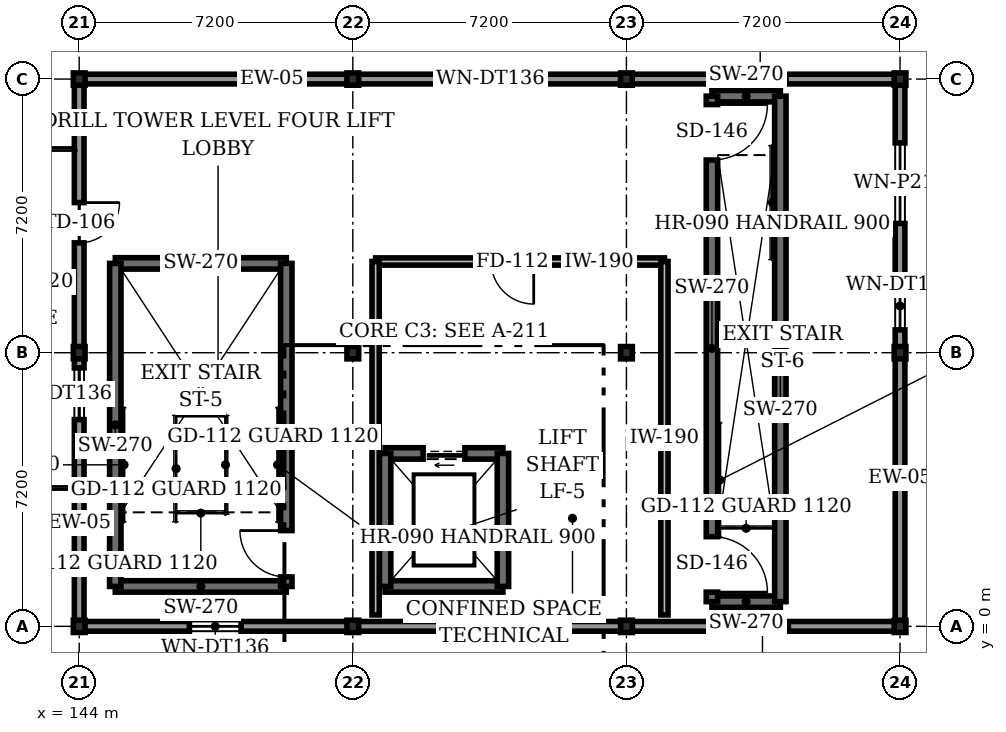
"""IFC4 building model, lengths in metres.
Left out: names, types, materials, properties, quantities, classifications, styles, units other than length and angle.
Written with IfcOpenShell. Run it as: python <this file> out.ifc"""

import sys

from ifc_helpers import new_model, si_unit, direction, frame, frame_2d, origin, origin_2d, place, context, subcontext, project, spatial, rectangle, i_section, extrude, element, fill, save


model = new_model("IFC4")
c1 = context("Model", 3, precision=1e-05, world=origin(), true_north=direction((0.0, 1.0)))
c2 = subcontext(c1, "Body", "Model", "MODEL_VIEW")
j1 = project(units=[si_unit("LENGTHUNIT", "METRE"), si_unit("PLANEANGLEUNIT", "RADIAN")], contexts=[c1])
p1 = place(None, origin())
s1 = spatial("IfcSite", under=j1, at=p1, CompositionType="ELEMENT")
p2 = place(p1, origin())
s2 = spatial("IfcBuilding", under=s1, at=p2, CompositionType="ELEMENT")
p3 = place(p2, frame((0.0, 0.0, 14.4)))
s3 = spatial("IfcBuildingStorey", under=s2, at=p3, CompositionType="ELEMENT", Elevation=14.4)
for number, where, z_axis, x_axis in (
    (1, (144.0, 0.0, 0.0), (0.0, 0.0, 1.0), (1.0, 0.0, 0.0)),
    (2, (144.0, 7.2, 0.0), (0.0, 0.0, 1.0), (1.0, 0.0, 0.0)),
    (3, (144.0, 14.4, 0.0), (0.0, 0.0, 1.0), (1.0, 0.0, 0.0)),
    (4, (151.2, 0.0, 0.0), (0.0, 0.0, 1.0), (1.0, 0.0, 0.0)),
    (5, (151.2, 7.2, 0.0), (0.0, 0.0, 1.0), (1.0, 0.0, 0.0)),
    (6, (151.2, 14.4, 0.0), (0.0, 0.0, 1.0), (1.0, 0.0, 0.0)),
    (7, (158.4, 0.0, 0.0), (0.0, 0.0, 1.0), (1.0, 0.0, 0.0)),
    (8, (158.4, 7.2, 0.0), (0.0, 0.0, 1.0), (1.0, 0.0, 0.0)),
    (9, (158.4, 14.4, 0.0), (0.0, 0.0, 1.0), (1.0, 0.0, 0.0)),
    (10, (165.6, 0.0, 0.0), (0.0, 0.0, 1.0), (1.0, 0.0, 0.0)),
    (11, (165.6, 7.2, 0.0), (0.0, 0.0, 1.0), (1.0, 0.0, 0.0)),
    (12, (165.6, 14.4, 0.0), (0.0, 0.0, 1.0), (1.0, 0.0, 0.0)),
):
    element("IfcColumn", number, at=place(p3, frame(where, z_axis=z_axis, x_axis=x_axis)), inside=s3, PredefinedType="COLUMN", context=c2, shape_type="SweptSolid", body=[
        extrude(i_section(OverallWidth=0.309, OverallDepth=0.323, WebThickness=0.014, FlangeThickness=0.023, at=origin_2d()), origin(), (0.0, 0.0, 1.0), 3.6),
    ])
p4 = place(p3, frame((165.6, 0.0, 0.0), z_axis=(0.0, 0.0, 1.0), x_axis=(-1.0, 0.0, 0.0)))
e13 = element("IfcWall", 13, at=p4, inside=s3, PredefinedType="STANDARD", context=c2, shape_type="SweptSolid", body=[
    extrude(rectangle(XDim=21.6, YDim=0.255, at=frame_2d((10.8, 0.0))), origin(), (0.0, 0.0, 1.0), 2.75),
])
p5 = place(p4, frame((17.34, 0.0, 1.15)))
e14 = element("IfcOpeningElement", 14, at=p5, cuts=e13, PredefinedType="OPENING", context=c2, shape_type="SweptSolid", body=[
    extrude(rectangle(XDim=1.36, YDim=1.42, at=frame_2d((0.68, 0.71))), frame((0.0, 0.137, 0.0), z_axis=(0.0, -1.0, 0.0), x_axis=(1.0, 0.0, 0.0)), (0.0, 0.0, 1.0), 0.275),
])
p6 = place(p4, frame((2.94, 0.0, 1.15)))
e15 = element("IfcOpeningElement", 15, at=p6, cuts=e13, PredefinedType="OPENING", context=c2, shape_type="SweptSolid", body=[
    extrude(rectangle(XDim=1.36, YDim=1.42, at=frame_2d((0.68, 0.71))), frame((0.0, 0.137, 0.0), z_axis=(0.0, -1.0, 0.0), x_axis=(1.0, 0.0, 0.0)), (0.0, 0.0, 1.0), 0.275),
])
p7 = place(p3, frame((165.6, 0.0, 0.0), z_axis=(0.0, 0.0, 1.0), x_axis=(0.0, 1.0, 0.0)))
e16 = element("IfcWall", 16, at=p7, inside=s3, PredefinedType="STANDARD", context=c2, shape_type="SweptSolid", body=[
    extrude(rectangle(XDim=14.4, YDim=0.255, at=frame_2d((7.2, 0.0))), origin(), (0.0, 0.0, 1.0), 2.75),
])
p8 = place(p7, frame((7.8, 0.0, 1.05)))
e17 = element("IfcOpeningElement", 17, at=p8, cuts=e16, PredefinedType="OPENING", context=c2, shape_type="SweptSolid", body=[
    extrude(rectangle(XDim=1.26, YDim=1.38, at=frame_2d((0.63, 0.69))), frame((0.0, 0.137, 0.0), z_axis=(0.0, -1.0, 0.0), x_axis=(1.0, 0.0, 0.0)), (0.0, 0.0, 1.0), 0.275),
])
p9 = place(p7, frame((10.6, 0.0, 1.05)))
e18 = element("IfcOpeningElement", 18, at=p9, cuts=e16, PredefinedType="OPENING", context=c2, shape_type="SweptSolid", body=[
    extrude(rectangle(XDim=2.12, YDim=1.76, at=frame_2d((1.06, 0.88))), frame((0.0, 0.137, 0.0), z_axis=(0.0, -1.0, 0.0), x_axis=(1.0, 0.0, 0.0)), (0.0, 0.0, 1.0), 0.275),
])
p10 = place(p3, frame((144.0, 14.4, 0.0), z_axis=(0.0, 0.0, 1.0), x_axis=(0.0, -1.0, 0.0)))
e19 = element("IfcWall", 19, at=p10, inside=s3, PredefinedType="STANDARD", context=c2, shape_type="SweptSolid", body=[
    extrude(rectangle(XDim=14.4, YDim=0.255, at=frame_2d((7.2, 0.0))), origin(), (0.0, 0.0, 1.0), 2.75),
])
p11 = place(p10, frame((3.25, 0.0, 0.0)))
e20 = element("IfcOpeningElement", 20, at=p11, cuts=e19, PredefinedType="OPENING", context=c2, shape_type="SweptSolid", body=[
    extrude(rectangle(XDim=1.06, YDim=2.16, at=frame_2d((0.53, 1.08))), frame((0.0, 0.137, 0.0), z_axis=(0.0, -1.0, 0.0), x_axis=(1.0, 0.0, 0.0)), (0.0, 0.0, 1.0), 0.275),
])
p12 = place(p10, frame((7.6, 0.0, 1.05)))
e21 = element("IfcOpeningElement", 21, at=p12, cuts=e19, PredefinedType="OPENING", context=c2, shape_type="SweptSolid", body=[
    extrude(rectangle(XDim=1.36, YDim=1.42, at=frame_2d((0.68, 0.71))), frame((0.0, 0.137, 0.0), z_axis=(0.0, -1.0, 0.0), x_axis=(1.0, 0.0, 0.0)), (0.0, 0.0, 1.0), 0.275),
])
p13 = place(p3, frame((165.6, 14.4, 0.0), z_axis=(0.0, 0.0, 1.0), x_axis=(-1.0, 0.0, 0.0)))
e22 = element("IfcWall", 22, at=p13, inside=s3, PredefinedType="STANDARD", context=c2, shape_type="SweptSolid", body=[
    extrude(rectangle(XDim=21.6, YDim=0.255, at=frame_2d((10.8, 0.0))), origin(), (0.0, 0.0, 1.0), 2.75),
])
p14 = place(p13, frame((3.0, 0.0, 1.15)))
e23 = element("IfcOpeningElement", 23, at=p14, cuts=e22, PredefinedType="OPENING", context=c2, shape_type="SweptSolid", body=[
    extrude(rectangle(XDim=1.36, YDim=1.42, at=frame_2d((0.68, 0.71))), frame((0.0, 0.137, 0.0), z_axis=(0.0, -1.0, 0.0), x_axis=(1.0, 0.0, 0.0)), (0.0, 0.0, 1.0), 0.275),
])
p15 = place(p13, frame((10.1, 0.0, 1.15)))
e24 = element("IfcOpeningElement", 24, at=p15, cuts=e22, PredefinedType="OPENING", context=c2, shape_type="SweptSolid", body=[
    extrude(rectangle(XDim=1.36, YDim=1.42, at=frame_2d((0.68, 0.71))), frame((0.0, 0.137, 0.0), z_axis=(0.0, -1.0, 0.0), x_axis=(1.0, 0.0, 0.0)), (0.0, 0.0, 1.0), 0.275),
])
for number, where, z_axis, x_axis in (
    (25, (144.95, 1.05, 0.0), (0.0, 0.0, 1.0), (1.0, 0.0, 0.0)),
    (26, (149.45, 9.55, 0.0), (0.0, 0.0, 1.0), (-1.0, 0.0, 0.0)),
):
    element("IfcWall", number, at=place(p3, frame(where, z_axis=z_axis, x_axis=x_axis)), inside=s3, PredefinedType="SHEAR", context=c2, shape_type="SweptSolid", body=[
        extrude(rectangle(XDim=4.5, YDim=0.3, at=frame_2d((2.25, 0.0))), origin(), (0.0, 0.0, 1.0), 3.36),
    ])
p16 = place(p3, frame((144.95, 9.55, 0.0), z_axis=(0.0, 0.0, 1.0), x_axis=(0.0, -1.0, 0.0)))
e27 = element("IfcWall", 27, at=p16, inside=s3, PredefinedType="SHEAR", context=c2, shape_type="SweptSolid", body=[
    extrude(rectangle(XDim=8.5, YDim=0.3, at=frame_2d((4.25, 0.0))), origin(), (0.0, 0.0, 1.0), 3.36),
])
p17 = place(p3, frame((149.45, 1.05, 0.0), z_axis=(0.0, 0.0, 1.0), x_axis=(0.0, 1.0, 0.0)))
e28 = element("IfcWall", 28, at=p17, inside=s3, PredefinedType="SHEAR", context=c2, shape_type="SweptSolid", body=[
    extrude(rectangle(XDim=8.5, YDim=0.3, at=frame_2d((4.25, 0.0))), origin(), (0.0, 0.0, 1.0), 3.36),
])
p18 = place(p17, frame((0.25, 0.0, 0.0)))
e29 = element("IfcOpeningElement", 29, at=p18, cuts=e28, PredefinedType="OPENING", context=c2, shape_type="SweptSolid", body=[
    extrude(rectangle(XDim=1.22, YDim=2.16, at=frame_2d((0.61, 1.08))), frame((0.0, 0.16, 0.0), z_axis=(0.0, -1.0, 0.0), x_axis=(1.0, 0.0, 0.0)), (0.0, 0.0, 1.0), 0.32),
])
p19 = place(p3, frame((152.05, 1.05, 0.0), z_axis=(0.0, 0.0, 1.0), x_axis=(1.0, 0.0, 0.0)))
e30 = element("IfcWall", 30, at=p19, inside=s3, PredefinedType="SHEAR", context=c2, shape_type="SweptSolid", body=[
    extrude(rectangle(XDim=3.1, YDim=0.3, at=frame_2d((1.55, 0.0))), origin(), (0.0, 0.0, 1.0), 3.36),
])
p20 = place(p3, frame((155.15, 4.55, 0.0), z_axis=(0.0, 0.0, 1.0), x_axis=(-1.0, 0.0, 0.0)))
e31 = element("IfcWall", 31, at=p20, inside=s3, PredefinedType="SHEAR", context=c2, shape_type="SweptSolid", body=[
    extrude(rectangle(XDim=3.1, YDim=0.3, at=frame_2d((1.55, 0.0))), origin(), (0.0, 0.0, 1.0), 3.36),
])
p21 = place(p20, frame((1.0, 0.0, 0.0)))
e32 = element("IfcOpeningElement", 32, at=p21, cuts=e31, PredefinedType="OPENING", context=c2, shape_type="SweptSolid", body=[
    extrude(rectangle(XDim=1.1, YDim=2.22, at=frame_2d((0.55, 1.11))), frame((0.0, 0.16, 0.0), z_axis=(0.0, -1.0, 0.0), x_axis=(1.0, 0.0, 0.0)), (0.0, 0.0, 1.0), 0.32),
])
for number, where, z_axis, x_axis in (
    (33, (152.05, 4.55, 0.0), (0.0, 0.0, 1.0), (0.0, -1.0, 0.0)),
    (34, (155.15, 1.05, 0.0), (0.0, 0.0, 1.0), (0.0, 1.0, 0.0)),
):
    element("IfcWall", number, at=place(p3, frame(where, z_axis=z_axis, x_axis=x_axis)), inside=s3, PredefinedType="SHEAR", context=c2, shape_type="SweptSolid", body=[
        extrude(rectangle(XDim=3.5, YDim=0.3, at=frame_2d((1.75, 0.0))), origin(), (0.0, 0.0, 1.0), 3.36),
    ])
for number, where, z_axis, x_axis in (
    (35, (160.65, 0.65, 0.0), (0.0, 0.0, 1.0), (1.0, 0.0, 0.0)),
    (36, (162.45, 13.95, 0.0), (0.0, 0.0, 1.0), (-1.0, 0.0, 0.0)),
):
    element("IfcWall", number, at=place(p3, frame(where, z_axis=z_axis, x_axis=x_axis)), inside=s3, PredefinedType="SHEAR", context=c2, shape_type="SweptSolid", body=[
        extrude(rectangle(XDim=1.8, YDim=0.3, at=frame_2d((0.9, 0.0))), origin(), (0.0, 0.0, 1.0), 3.36),
    ])
p22 = place(p3, frame((160.65, 13.95, 0.0), z_axis=(0.0, 0.0, 1.0), x_axis=(0.0, -1.0, 0.0)))
e37 = element("IfcWall", 37, at=p22, inside=s3, PredefinedType="SHEAR", context=c2, shape_type="SweptSolid", body=[
    extrude(rectangle(XDim=13.3, YDim=0.3, at=frame_2d((6.65, 0.0))), origin(), (0.0, 0.0, 1.0), 3.36),
])
p23 = place(p22, frame((11.59, 0.0, 0.0)))
e38 = element("IfcOpeningElement", 38, at=p23, cuts=e37, PredefinedType="OPENING", context=c2, shape_type="SweptSolid", body=[
    extrude(rectangle(XDim=1.46, YDim=2.24, at=frame_2d((0.73, 1.12))), frame((0.0, 0.16, 0.0), z_axis=(0.0, -1.0, 0.0), x_axis=(1.0, 0.0, 0.0)), (0.0, 0.0, 1.0), 0.32),
])
p24 = place(p22, frame((0.22, 0.0, 0.0)))
e39 = element("IfcOpeningElement", 39, at=p24, cuts=e37, PredefinedType="OPENING", context=c2, shape_type="SweptSolid", body=[
    extrude(rectangle(XDim=1.46, YDim=2.24, at=frame_2d((0.73, 1.12))), frame((0.0, 0.16, 0.0), z_axis=(0.0, -1.0, 0.0), x_axis=(1.0, 0.0, 0.0)), (0.0, 0.0, 1.0), 0.32),
])
p25 = place(p3, frame((162.45, 0.65, 0.0), z_axis=(0.0, 0.0, 1.0), x_axis=(0.0, 1.0, 0.0)))
e40 = element("IfcWall", 40, at=p25, inside=s3, PredefinedType="SHEAR", context=c2, shape_type="SweptSolid", body=[
    extrude(rectangle(XDim=13.3, YDim=0.3, at=frame_2d((6.65, 0.0))), origin(), (0.0, 0.0, 1.0), 3.36),
])
p26 = place(p3, frame((159.4, 9.6, 0.0), z_axis=(0.0, 0.0, 1.0), x_axis=(-1.0, 0.0, 0.0)))
e41 = element("IfcWall", 41, at=p26, inside=s3, PredefinedType="STANDARD", context=c2, shape_type="SweptSolid", body=[
    extrude(rectangle(XDim=7.6, YDim=0.19, at=frame_2d((3.8, 0.0))), origin(), (0.0, 0.0, 1.0), 2.827),
])
p27 = place(p26, frame((3.44, 0.0, 0.0)))
e42 = element("IfcOpeningElement", 42, at=p27, cuts=e41, PredefinedType="OPENING", context=c2, shape_type="SweptSolid", body=[
    extrude(rectangle(XDim=1.12, YDim=2.16, at=frame_2d((0.56, 1.08))), frame((0.0, 0.105, 0.0), z_axis=(0.0, -1.0, 0.0), x_axis=(1.0, 0.0, 0.0)), (0.0, 0.0, 1.0), 0.21),
])
p28 = place(p3, frame((151.8, 9.6, 0.0), z_axis=(0.0, 0.0, 1.0), x_axis=(0.0, -1.0, 0.0)))
e43 = element("IfcWall", 43, at=p28, inside=s3, PredefinedType="STANDARD", context=c2, shape_type="SweptSolid", body=[
    extrude(rectangle(XDim=9.3, YDim=0.19, at=frame_2d((4.65, 0.0))), origin(), (0.0, 0.0, 1.0), 2.827),
])
p29 = place(p3, frame((159.4, 0.3, 0.0), z_axis=(0.0, 0.0, 1.0), x_axis=(0.0, 1.0, 0.0)))
e44 = element("IfcWall", 44, at=p29, inside=s3, PredefinedType="STANDARD", context=c2, shape_type="SweptSolid", body=[
    extrude(rectangle(XDim=9.3, YDim=0.19, at=frame_2d((4.65, 0.0))), origin(), (0.0, 0.0, 1.0), 3.36),
])
p30 = place(p5, origin())
e45 = element("IfcWindow", 45, at=p30, inside=s3, PartitioningType="SINGLE_PANEL", PredefinedType="WINDOW", context=c2, shape_type="SweptSolid", body=[
    extrude(rectangle(XDim=1.36, YDim=1.42, at=frame_2d((0.68, 0.71))), frame((0.0, 0.03, 0.0), z_axis=(0.0, -1.0, 0.0), x_axis=(1.0, 0.0, 0.0)), (0.0, 0.0, 1.0), 0.06),
])
fill(e14, e45)
p31 = place(p6, origin())
e46 = element("IfcWindow", 46, at=p31, inside=s3, PartitioningType="SINGLE_PANEL", PredefinedType="WINDOW", context=c2, shape_type="SweptSolid", body=[
    extrude(rectangle(XDim=1.36, YDim=1.42, at=frame_2d((0.68, 0.71))), frame((0.0, 0.03, 0.0), z_axis=(0.0, -1.0, 0.0), x_axis=(1.0, 0.0, 0.0)), (0.0, 0.0, 1.0), 0.06),
])
fill(e15, e46)
p32 = place(p8, origin())
e47 = element("IfcWindow", 47, at=p32, inside=s3, PartitioningType="SINGLE_PANEL", PredefinedType="WINDOW", context=c2, shape_type="SweptSolid", body=[
    extrude(rectangle(XDim=1.26, YDim=1.38, at=frame_2d((0.63, 0.69))), frame((0.0, 0.03, 0.0), z_axis=(0.0, -1.0, 0.0), x_axis=(1.0, 0.0, 0.0)), (0.0, 0.0, 1.0), 0.06),
])
fill(e17, e47)
p33 = place(p9, origin())
e48 = element("IfcWindow", 48, at=p33, inside=s3, PartitioningType="SINGLE_PANEL", PredefinedType="WINDOW", context=c2, shape_type="SweptSolid", body=[
    extrude(rectangle(XDim=2.12, YDim=1.76, at=frame_2d((1.06, 0.88))), frame((0.0, 0.03, 0.0), z_axis=(0.0, -1.0, 0.0), x_axis=(1.0, 0.0, 0.0)), (0.0, 0.0, 1.0), 0.06),
])
fill(e18, e48)
p34 = place(p11, origin())
e49 = element("IfcDoor", 49, at=p34, inside=s3, OperationType="SINGLE_SWING_LEFT", PredefinedType="DOOR", context=c2, shape_type="SweptSolid", body=[
    extrude(rectangle(XDim=1.06, YDim=2.16, at=frame_2d((0.53, 1.08))), frame((0.0, 0.025, 0.0), z_axis=(0.0, -1.0, 0.0), x_axis=(1.0, 0.0, 0.0)), (0.0, 0.0, 1.0), 0.05),
])
fill(e20, e49)
p35 = place(p12, origin())
e50 = element("IfcWindow", 50, at=p35, inside=s3, PartitioningType="SINGLE_PANEL", PredefinedType="WINDOW", context=c2, shape_type="SweptSolid", body=[
    extrude(rectangle(XDim=1.36, YDim=1.42, at=frame_2d((0.68, 0.71))), frame((0.0, 0.03, 0.0), z_axis=(0.0, -1.0, 0.0), x_axis=(1.0, 0.0, 0.0)), (0.0, 0.0, 1.0), 0.06),
])
fill(e21, e50)
p36 = place(p14, origin())
e51 = element("IfcWindow", 51, at=p36, inside=s3, PartitioningType="SINGLE_PANEL", PredefinedType="WINDOW", context=c2, shape_type="SweptSolid", body=[
    extrude(rectangle(XDim=1.36, YDim=1.42, at=frame_2d((0.68, 0.71))), frame((0.0, 0.03, 0.0), z_axis=(0.0, -1.0, 0.0), x_axis=(1.0, 0.0, 0.0)), (0.0, 0.0, 1.0), 0.06),
])
fill(e23, e51)
p37 = place(p15, origin())
e52 = element("IfcWindow", 52, at=p37, inside=s3, PartitioningType="SINGLE_PANEL", PredefinedType="WINDOW", context=c2, shape_type="SweptSolid", body=[
    extrude(rectangle(XDim=1.36, YDim=1.42, at=frame_2d((0.68, 0.71))), frame((0.0, 0.03, 0.0), z_axis=(0.0, -1.0, 0.0), x_axis=(1.0, 0.0, 0.0)), (0.0, 0.0, 1.0), 0.06),
])
fill(e24, e52)
p38 = place(p18, origin())
e53 = element("IfcDoor", 53, at=p38, inside=s3, OperationType="SINGLE_SWING_RIGHT", PredefinedType="DOOR", context=c2, shape_type="SweptSolid", body=[
    extrude(rectangle(XDim=1.22, YDim=2.16, at=frame_2d((0.61, 1.08))), frame((0.0, 0.025, 0.0), z_axis=(0.0, -1.0, 0.0), x_axis=(1.0, 0.0, 0.0)), (0.0, 0.0, 1.0), 0.05),
])
fill(e29, e53)
p39 = place(p21, origin())
e54 = element("IfcDoor", 54, at=p39, inside=s3, OperationType="SLIDING_TO_LEFT", PredefinedType="DOOR", context=c2, shape_type="SweptSolid", body=[
    extrude(rectangle(XDim=1.1, YDim=2.22, at=frame_2d((0.55, 1.11))), frame((0.0, 0.025, 0.0), z_axis=(0.0, -1.0, 0.0), x_axis=(1.0, 0.0, 0.0)), (0.0, 0.0, 1.0), 0.05),
])
fill(e32, e54)
p40 = place(p23, origin())
e55 = element("IfcDoor", 55, at=p40, inside=s3, OperationType="SINGLE_SWING_RIGHT", PredefinedType="DOOR", context=c2, shape_type="SweptSolid", body=[
    extrude(rectangle(XDim=1.46, YDim=2.24, at=frame_2d((0.73, 1.12))), frame((0.0, 0.025, 0.0), z_axis=(0.0, -1.0, 0.0), x_axis=(1.0, 0.0, 0.0)), (0.0, 0.0, 1.0), 0.05),
])
fill(e38, e55)
p41 = place(p24, origin())
e56 = element("IfcDoor", 56, at=p41, inside=s3, OperationType="SINGLE_SWING_LEFT", PredefinedType="DOOR", context=c2, shape_type="SweptSolid", body=[
    extrude(rectangle(XDim=1.46, YDim=2.24, at=frame_2d((0.73, 1.12))), frame((0.0, 0.025, 0.0), z_axis=(0.0, -1.0, 0.0), x_axis=(1.0, 0.0, 0.0)), (0.0, 0.0, 1.0), 0.05),
])
fill(e39, e56)
p42 = place(p27, origin())
e57 = element("IfcDoor", 57, at=p42, inside=s3, OperationType="SINGLE_SWING_LEFT", PredefinedType="DOOR", context=c2, shape_type="SweptSolid", body=[
    extrude(rectangle(XDim=1.12, YDim=2.16, at=frame_2d((0.56, 1.08))), frame((0.0, 0.025, 0.0), z_axis=(0.0, -1.0, 0.0), x_axis=(1.0, 0.0, 0.0)), (0.0, 0.0, 1.0), 0.05),
])
fill(e42, e57)
save(model, sys.argv[1])
